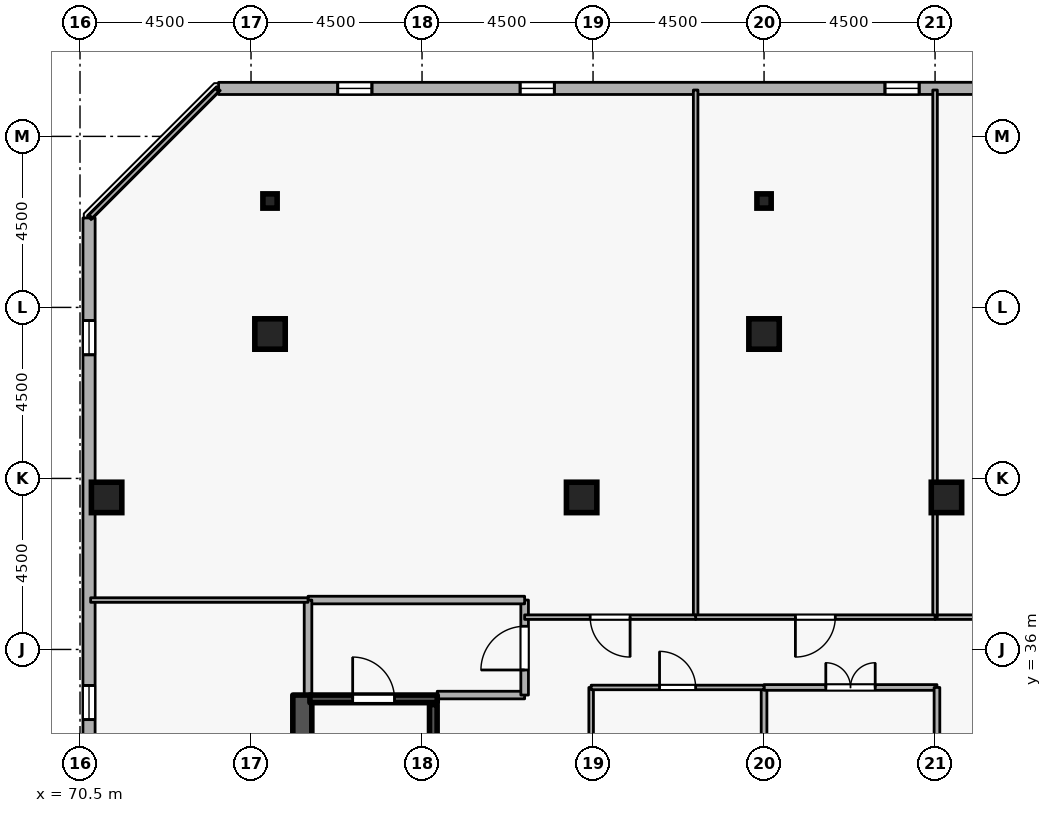
"""IFC4 building model, lengths in metres.
Left out: names, types, materials, properties, quantities, classifications, styles, units other than length and angle.
Written with IfcOpenShell. Run it as: python <this file> out.ifc"""

import sys

from ifc_helpers import new_model, si_unit, direction, frame, frame_2d, origin, origin_2d, place, context, subcontext, project, spatial, rectangle, i_section, extrude, element, fill, save


model = new_model("IFC4")
c1 = context("Model", 3, precision=1e-05, world=origin(), true_north=direction((0.0, 1.0)))
c2 = subcontext(c1, "Body", "Model", "MODEL_VIEW")
j1 = project(units=[si_unit("LENGTHUNIT", "METRE"), si_unit("PLANEANGLEUNIT", "RADIAN")], contexts=[c1])
p1 = place(None, origin())
s1 = spatial("IfcSite", under=j1, at=p1, CompositionType="ELEMENT")
p2 = place(p1, origin())
s2 = spatial("IfcBuilding", under=s1, at=p2, CompositionType="ELEMENT")
p3 = place(p2, frame((0.0, 0.0, 265.5)))
s3 = spatial("IfcBuildingStorey", under=s2, at=p3, CompositionType="ELEMENT", Elevation=265.5)
p4 = place(p3, frame((76.35, 19.2, 0.0), z_axis=(0.0, 0.0, 1.0), x_axis=(0.0, 1.0, 0.0)))
e1 = element("IfcWall", 1, at=p4, inside=s3, PredefinedType="SHEAR", context=c2, shape_type="SweptSolid", body=[
    extrude(rectangle(XDim=15.6, YDim=0.5, at=frame_2d((7.8, 0.0))), origin(), (0.0, 0.0, 1.0), 3.6),
])
for number, where, z_axis, x_axis in (
    (2, (88.5, 44.3, 0.0), (0.0, 0.0, 1.0), (1.0, 0.0, 0.0)),
    (3, (75.5, 44.3, 0.0), (0.0, 0.0, 1.0), (1.0, 0.0, 0.0)),
    (4, (71.2, 40.0, 0.0), (0.0, 0.0, 1.0), (1.0, 0.0, 0.0)),
    (5, (93.3, 40.0, 0.0), (0.0, 0.0, 1.0), (1.0, 0.0, 0.0)),
    (6, (83.7, 40.0, 0.0), (0.0, 0.0, 1.0), (1.0, 0.0, 0.0)),
):
    element("IfcColumn", number, at=place(p3, frame(where, z_axis=z_axis, x_axis=x_axis)), inside=s3, PredefinedType="COLUMN", context=c2, shape_type="SweptSolid", body=[
        extrude(rectangle(XDim=0.8, YDim=0.8, at=origin_2d()), origin(), (0.0, 0.0, 1.0), 3.6),
    ])
for number, where, z_axis, x_axis in (
    (7, (88.5, 47.8, 0.0), (0.0, 0.0, 1.0), (1.0, 0.0, 0.0)),
    (8, (75.5, 47.8, 0.0), (0.0, 0.0, 1.0), (1.0, 0.0, 0.0)),
):
    element("IfcColumn", number, at=place(p3, frame(where, z_axis=z_axis, x_axis=x_axis)), inside=s3, PredefinedType="COLUMN", context=c2, shape_type="SweptSolid", body=[
        extrude(i_section(OverallWidth=0.375, OverallDepth=0.375, WebThickness=0.017, FlangeThickness=0.027, FilletRadius=0.015, at=origin_2d()), origin(), (0.0, 0.0, 1.0), 3.6),
    ])
p5 = place(p3, frame((109.681, 50.765, 0.0), z_axis=(0.0, 0.0, 1.0), x_axis=(-0.999999997144, -7.5574884e-05, 0.0)))
e9 = element("IfcWall", 9, at=p5, inside=s3, PredefinedType="STANDARD", context=c2, shape_type="SweptSolid", body=[
    extrude(rectangle(XDim=35.535, YDim=0.32, at=frame_2d((17.768, 0.0))), origin(), (0.0, 0.0, 1.0), 2.7),
])
p6 = place(p5, frame((2.7, 0.0, 0.72)))
e10 = element("IfcOpeningElement", 10, at=p6, cuts=e9, PredefinedType="OPENING", context=c2, shape_type="SweptSolid", body=[
    extrude(rectangle(XDim=0.9, YDim=1.75, at=frame_2d((0.45, 0.875))), frame((0.0, 0.17, 0.0), z_axis=(0.0, -1.0, 0.0), x_axis=(1.0, 0.0, 0.0)), (0.0, 0.0, 1.0), 0.34),
])
p7 = place(p5, frame((7.5, 0.0, 0.72)))
e11 = element("IfcOpeningElement", 11, at=p7, cuts=e9, PredefinedType="OPENING", context=c2, shape_type="SweptSolid", body=[
    extrude(rectangle(XDim=0.9, YDim=1.75, at=frame_2d((0.45, 0.875))), frame((0.0, 0.17, 0.0), z_axis=(0.0, -1.0, 0.0), x_axis=(1.0, 0.0, 0.0)), (0.0, 0.0, 1.0), 0.34),
])
p8 = place(p5, frame((12.3, 0.0, 0.72)))
e12 = element("IfcOpeningElement", 12, at=p8, cuts=e9, PredefinedType="OPENING", context=c2, shape_type="SweptSolid", body=[
    extrude(rectangle(XDim=0.9, YDim=1.75, at=frame_2d((0.45, 0.875))), frame((0.0, 0.17, 0.0), z_axis=(0.0, -1.0, 0.0), x_axis=(1.0, 0.0, 0.0)), (0.0, 0.0, 1.0), 0.34),
])
p9 = place(p5, frame((17.1, 0.0, 0.72)))
e13 = element("IfcOpeningElement", 13, at=p9, cuts=e9, PredefinedType="OPENING", context=c2, shape_type="SweptSolid", body=[
    extrude(rectangle(XDim=0.9, YDim=1.75, at=frame_2d((0.45, 0.875))), frame((0.0, 0.17, 0.0), z_axis=(0.0, -1.0, 0.0), x_axis=(1.0, 0.0, 0.0)), (0.0, 0.0, 1.0), 0.34),
])
p10 = place(p5, frame((26.7, 0.0, 0.72)))
e14 = element("IfcOpeningElement", 14, at=p10, cuts=e9, PredefinedType="OPENING", context=c2, shape_type="SweptSolid", body=[
    extrude(rectangle(XDim=0.9, YDim=1.75, at=frame_2d((0.45, 0.875))), frame((0.0, 0.17, 0.0), z_axis=(0.0, -1.0, 0.0), x_axis=(1.0, 0.0, 0.0)), (0.0, 0.0, 1.0), 0.34),
])
p11 = place(p5, frame((31.5, 0.0, 0.72)))
e15 = element("IfcOpeningElement", 15, at=p11, cuts=e9, PredefinedType="OPENING", context=c2, shape_type="SweptSolid", body=[
    extrude(rectangle(XDim=0.9, YDim=1.75, at=frame_2d((0.45, 0.875))), frame((0.0, 0.17, 0.0), z_axis=(0.0, -1.0, 0.0), x_axis=(1.0, 0.0, 0.0)), (0.0, 0.0, 1.0), 0.34),
])
p12 = place(p3, frame((70.738, 47.354, 0.0), z_axis=(0.0, 0.0, 1.0), x_axis=(-7.5574884e-05, -0.999999997144, 0.0)))
e16 = element("IfcWall", 16, at=p12, inside=s3, PredefinedType="STANDARD", context=c2, shape_type="SweptSolid", body=[
    extrude(rectangle(XDim=35.535, YDim=0.32, at=frame_2d((17.768, 0.0))), origin(), (0.0, 0.0, 1.0), 2.7),
])
p13 = place(p12, frame((2.7, 0.0, 0.72)))
e17 = element("IfcOpeningElement", 17, at=p13, cuts=e16, PredefinedType="OPENING", context=c2, shape_type="SweptSolid", body=[
    extrude(rectangle(XDim=0.9, YDim=1.75, at=frame_2d((0.45, 0.875))), frame((0.0, 0.17, 0.0), z_axis=(0.0, -1.0, 0.0), x_axis=(1.0, 0.0, 0.0)), (0.0, 0.0, 1.0), 0.34),
])
p14 = place(p12, frame((12.3, 0.0, 0.72)))
e18 = element("IfcOpeningElement", 18, at=p14, cuts=e16, PredefinedType="OPENING", context=c2, shape_type="SweptSolid", body=[
    extrude(rectangle(XDim=0.9, YDim=1.75, at=frame_2d((0.45, 0.875))), frame((0.0, 0.17, 0.0), z_axis=(0.0, -1.0, 0.0), x_axis=(1.0, 0.0, 0.0)), (0.0, 0.0, 1.0), 0.34),
])
p15 = place(p12, frame((17.1, 0.0, 0.72)))
e19 = element("IfcOpeningElement", 19, at=p15, cuts=e16, PredefinedType="OPENING", context=c2, shape_type="SweptSolid", body=[
    extrude(rectangle(XDim=0.9, YDim=1.75, at=frame_2d((0.45, 0.875))), frame((0.0, 0.17, 0.0), z_axis=(0.0, -1.0, 0.0), x_axis=(1.0, 0.0, 0.0)), (0.0, 0.0, 1.0), 0.34),
])
p16 = place(p12, frame((21.9, 0.0, 0.72)))
e20 = element("IfcOpeningElement", 20, at=p16, cuts=e16, PredefinedType="OPENING", context=c2, shape_type="SweptSolid", body=[
    extrude(rectangle(XDim=0.9, YDim=1.75, at=frame_2d((0.45, 0.875))), frame((0.0, 0.17, 0.0), z_axis=(0.0, -1.0, 0.0), x_axis=(1.0, 0.0, 0.0)), (0.0, 0.0, 1.0), 0.34),
])
p17 = place(p12, frame((26.7, 0.0, 0.72)))
e21 = element("IfcOpeningElement", 21, at=p17, cuts=e16, PredefinedType="OPENING", context=c2, shape_type="SweptSolid", body=[
    extrude(rectangle(XDim=0.9, YDim=1.75, at=frame_2d((0.45, 0.875))), frame((0.0, 0.17, 0.0), z_axis=(0.0, -1.0, 0.0), x_axis=(1.0, 0.0, 0.0)), (0.0, 0.0, 1.0), 0.34),
])
p18 = place(p3, frame((76.55, 34.7, 0.0), z_axis=(0.0, 0.0, 1.0), x_axis=(1.0, 0.0, 0.0)))
e22 = element("IfcWall", 22, at=p18, inside=s3, PredefinedType="SHEAR", context=c2, shape_type="SweptSolid", body=[
    extrude(rectangle(XDim=3.35, YDim=0.2, at=frame_2d((1.675, 0.0))), origin(), (0.0, 0.0, 1.0), 3.6),
])
p19 = place(p18, frame((1.125, 0.0, 0.0)))
e23 = element("IfcOpeningElement", 23, at=p19, cuts=e22, PredefinedType="OPENING", context=c2, shape_type="SweptSolid", body=[
    extrude(rectangle(XDim=1.1, YDim=2.1, at=frame_2d((0.55, 1.05))), frame((0.0, 0.11, 0.0), z_axis=(0.0, -1.0, 0.0), x_axis=(1.0, 0.0, 0.0)), (0.0, 0.0, 1.0), 0.22),
])
p20 = place(p3, frame((79.797, 27.45, 0.0), z_axis=(0.0, 0.0, 1.0), x_axis=(0.0, 1.0, 0.0)))
e24 = element("IfcWall", 24, at=p20, inside=s3, PredefinedType="SHEAR", context=c2, shape_type="SweptSolid", body=[
    extrude(rectangle(XDim=7.1, YDim=0.2, at=frame_2d((3.55, 0.0))), origin(), (0.0, 0.0, 1.0), 3.6),
])
p21 = place(p3, frame((79.9, 34.8, 0.0), z_axis=(0.0, 0.0, 1.0), x_axis=(1.0, 0.0, 0.0)))
e25 = element("IfcWall", 25, at=p21, inside=s3, PredefinedType="STANDARD", context=c2, shape_type="SweptSolid", body=[
    extrude(rectangle(XDim=2.3, YDim=0.2, at=frame_2d((1.15, 0.0))), origin(), (0.0, 0.0, 1.0), 2.545),
])
p22 = place(p3, frame((82.2, 34.8, 0.0), z_axis=(0.0, 0.0, 1.0), x_axis=(0.0, 1.0, 0.0)))
e26 = element("IfcWall", 26, at=p22, inside=s3, PredefinedType="STANDARD", context=c2, shape_type="SweptSolid", body=[
    extrude(rectangle(XDim=2.5, YDim=0.2, at=frame_2d((1.25, 0.0))), origin(), (0.0, 0.0, 1.0), 3.34),
])
p23 = place(p22, frame((0.66, 0.0, 0.0)))
e27 = element("IfcOpeningElement", 27, at=p23, cuts=e26, PredefinedType="OPENING", context=c2, shape_type="SweptSolid", body=[
    extrude(rectangle(XDim=1.15, YDim=2.1, at=frame_2d((0.575, 1.05))), frame((0.0, 0.11, 0.0), z_axis=(0.0, -1.0, 0.0), x_axis=(1.0, 0.0, 0.0)), (0.0, 0.0, 1.0), 0.22),
])
p24 = place(p3, frame((82.2, 37.3, 0.0), z_axis=(0.0, 0.0, 1.0), x_axis=(-1.0, 0.0, 0.0)))
e28 = element("IfcWall", 28, at=p24, inside=s3, PredefinedType="STANDARD", context=c2, shape_type="SweptSolid", body=[
    extrude(rectangle(XDim=5.7, YDim=0.2, at=frame_2d((2.85, 0.0))), origin(), (0.0, 0.0, 1.0), 3.34),
])
p25 = place(p3, frame((76.5, 37.3, 0.0), z_axis=(0.0, 0.0, 1.0), x_axis=(0.0, -1.0, 0.0)))
e29 = element("IfcWall", 29, at=p25, inside=s3, PredefinedType="STANDARD", context=c2, shape_type="SweptSolid", body=[
    extrude(rectangle(XDim=2.5, YDim=0.2, at=frame_2d((1.25, 0.0))), origin(), (0.0, 0.0, 1.0), 3.34),
])
p26 = place(p3, frame((100.7, 36.85, 0.0), z_axis=(0.0, 0.0, 1.0), x_axis=(-1.0, 0.0, 0.0)))
e30 = element("IfcWall", 30, at=p26, inside=s3, PredefinedType="PARTITIONING", context=c2, shape_type="SweptSolid", body=[
    extrude(rectangle(XDim=7.7, YDim=0.12, at=frame_2d((3.85, 0.0))), origin(), (0.0, 0.0, 1.0), 3.34),
])
p27 = place(p26, frame((3.325, 0.0, 0.0)))
e31 = element("IfcOpeningElement", 31, at=p27, cuts=e30, PredefinedType="OPENING", context=c2, shape_type="SweptSolid", body=[
    extrude(rectangle(XDim=1.05, YDim=2.1, at=frame_2d((0.525, 1.05))), frame((0.0, 0.07, 0.0), z_axis=(0.0, -1.0, 0.0), x_axis=(1.0, 0.0, 0.0)), (0.0, 0.0, 1.0), 0.14),
])
for number, where, z_axis, x_axis in (
    (32, (93.0, 36.85, 0.0), (0.0, 0.0, 1.0), (0.0, 1.0, 0.0)),
    (33, (86.7, 36.85, 0.0), (0.0, 0.0, 1.0), (0.0, 1.0, 0.0)),
):
    element("IfcWall", number, at=place(p3, frame(where, z_axis=z_axis, x_axis=x_axis)), inside=s3, PredefinedType="PARTITIONING", context=c2, shape_type="SweptSolid", body=[
        extrude(rectangle(XDim=13.87, YDim=0.12, at=frame_2d((6.935, 0.0))), origin(), (0.0, 0.0, 1.0), 3.34),
    ])
p28 = place(p3, frame((93.0, 36.85, 0.0), z_axis=(0.0, 0.0, 1.0), x_axis=(-1.0, 0.0, 0.0)))
e34 = element("IfcWall", 34, at=p28, inside=s3, PredefinedType="PARTITIONING", context=c2, shape_type="SweptSolid", body=[
    extrude(rectangle(XDim=6.3, YDim=0.12, at=frame_2d((3.15, 0.0))), origin(), (0.0, 0.0, 1.0), 3.34),
])
p29 = place(p28, frame((2.625, 0.0, 0.0)))
e35 = element("IfcOpeningElement", 35, at=p29, cuts=e34, PredefinedType="OPENING", context=c2, shape_type="SweptSolid", body=[
    extrude(rectangle(XDim=1.05, YDim=2.1, at=frame_2d((0.525, 1.05))), frame((0.0, 0.07, 0.0), z_axis=(0.0, -1.0, 0.0), x_axis=(1.0, 0.0, 0.0)), (0.0, 0.0, 1.0), 0.14),
])
p30 = place(p3, frame((76.5, 37.3, 0.0), z_axis=(0.0, 0.0, 1.0), x_axis=(-1.0, 0.0, 0.0)))
e36 = element("IfcWall", 36, at=p30, inside=s3, PredefinedType="PARTITIONING", context=c2, shape_type="SweptSolid", body=[
    extrude(rectangle(XDim=5.72, YDim=0.12, at=frame_2d((2.86, 0.0))), origin(), (0.0, 0.0, 1.0), 3.34),
])
p31 = place(p3, frame((70.78, 47.394, 0.0), z_axis=(0.0, 0.0, 1.0), x_axis=(0.707106781187, 0.707106781187, 0.0)))
e37 = element("IfcWall", 37, at=p31, inside=s3, PredefinedType="PARTITIONING", context=c2, shape_type="SweptSolid", body=[
    extrude(rectangle(XDim=4.703, YDim=0.12, at=frame_2d((2.352, 0.0))), origin(), (0.0, 0.0, 1.0), 3.34),
])
p32 = place(p3, frame((86.7, 36.85, 0.0), z_axis=(0.0, 0.0, 1.0), x_axis=(-1.0, 0.0, 0.0)))
e38 = element("IfcWall", 38, at=p32, inside=s3, PredefinedType="PARTITIONING", context=c2, shape_type="SweptSolid", body=[
    extrude(rectangle(XDim=4.5, YDim=0.12, at=frame_2d((2.25, 0.0))), origin(), (0.0, 0.0, 1.0), 3.34),
])
p33 = place(p32, frame((1.725, 0.0, 0.0)))
e39 = element("IfcOpeningElement", 39, at=p33, cuts=e38, PredefinedType="OPENING", context=c2, shape_type="SweptSolid", body=[
    extrude(rectangle(XDim=1.05, YDim=2.1, at=frame_2d((0.525, 1.05))), frame((0.0, 0.07, 0.0), z_axis=(0.0, -1.0, 0.0), x_axis=(1.0, 0.0, 0.0)), (0.0, 0.0, 1.0), 0.14),
])
p34 = place(p3, frame((88.5, 32.2, 0.0), z_axis=(0.0, 0.0, 1.0), x_axis=(0.0, 1.0, 0.0)))
e40 = element("IfcWall", 40, at=p34, inside=s3, PredefinedType="PARTITIONING", context=c2, shape_type="SweptSolid", body=[
    extrude(rectangle(XDim=2.8, YDim=0.15, at=frame_2d((1.4, 0.0))), origin(), (0.0, 0.0, 1.0), 3.34),
])
p35 = place(p3, frame((88.5, 35.0, 0.0), z_axis=(0.0, 0.0, 1.0), x_axis=(1.0, 0.0, 0.0)))
e41 = element("IfcWall", 41, at=p35, inside=s3, PredefinedType="PARTITIONING", context=c2, shape_type="SweptSolid", body=[
    extrude(rectangle(XDim=4.55, YDim=0.15, at=frame_2d((2.275, 0.0))), origin(), (0.0, 0.0, 1.0), 3.34),
])
p36 = place(p35, frame((1.625, 0.0, 0.0)))
e42 = element("IfcOpeningElement", 42, at=p36, cuts=e41, PredefinedType="OPENING", context=c2, shape_type="SweptSolid", body=[
    extrude(rectangle(XDim=1.3, YDim=2.12, at=frame_2d((0.65, 1.06))), frame((0.0, 0.085, 0.0), z_axis=(0.0, -1.0, 0.0), x_axis=(1.0, 0.0, 0.0)), (0.0, 0.0, 1.0), 0.17),
])
p37 = place(p3, frame((93.05, 35.0, 0.0), z_axis=(0.0, 0.0, 1.0), x_axis=(0.0, -1.0, 0.0)))
e43 = element("IfcWall", 43, at=p37, inside=s3, PredefinedType="PARTITIONING", context=c2, shape_type="SweptSolid", body=[
    extrude(rectangle(XDim=2.8, YDim=0.15, at=frame_2d((1.4, 0.0))), origin(), (0.0, 0.0, 1.0), 3.34),
])
p38 = place(p3, frame((83.95, 32.2, 0.0), z_axis=(0.0, 0.0, 1.0), x_axis=(0.0, 1.0, 0.0)))
e44 = element("IfcWall", 44, at=p38, inside=s3, PredefinedType="PARTITIONING", context=c2, shape_type="SweptSolid", body=[
    extrude(rectangle(XDim=2.8, YDim=0.12, at=frame_2d((1.4, 0.0))), origin(), (0.0, 0.0, 1.0), 3.34),
])
p39 = place(p3, frame((83.95, 35.0, 0.0), z_axis=(0.0, 0.0, 1.0), x_axis=(1.0, 0.0, 0.0)))
e45 = element("IfcWall", 45, at=p39, inside=s3, PredefinedType="PARTITIONING", context=c2, shape_type="SweptSolid", body=[
    extrude(rectangle(XDim=4.55, YDim=0.12, at=frame_2d((2.275, 0.0))), origin(), (0.0, 0.0, 1.0), 3.34),
])
p40 = place(p39, frame((1.8, 0.0, 0.0)))
e46 = element("IfcOpeningElement", 46, at=p40, cuts=e45, PredefinedType="OPENING", context=c2, shape_type="SweptSolid", body=[
    extrude(rectangle(XDim=0.95, YDim=2.1, at=frame_2d((0.475, 1.05))), frame((0.0, 0.07, 0.0), z_axis=(0.0, -1.0, 0.0), x_axis=(1.0, 0.0, 0.0)), (0.0, 0.0, 1.0), 0.14),
])
p41 = place(p9, origin())
e47 = element("IfcWindow", 47, at=p41, inside=s3, PartitioningType="SINGLE_PANEL", PredefinedType="WINDOW", context=c2, shape_type="SweptSolid", body=[
    extrude(rectangle(XDim=0.9, YDim=1.75, at=frame_2d((0.45, 0.875))), frame((0.0, 0.03, 0.0), z_axis=(0.0, -1.0, 0.0), x_axis=(1.0, 0.0, 0.0)), (0.0, 0.0, 1.0), 0.06),
])
fill(e13, e47)
p42 = place(p10, origin())
e48 = element("IfcWindow", 48, at=p42, inside=s3, PartitioningType="SINGLE_PANEL", PredefinedType="WINDOW", context=c2, shape_type="SweptSolid", body=[
    extrude(rectangle(XDim=0.9, YDim=1.75, at=frame_2d((0.45, 0.875))), frame((0.0, 0.03, 0.0), z_axis=(0.0, -1.0, 0.0), x_axis=(1.0, 0.0, 0.0)), (0.0, 0.0, 1.0), 0.06),
])
fill(e14, e48)
p43 = place(p11, origin())
e49 = element("IfcWindow", 49, at=p43, inside=s3, PartitioningType="SINGLE_PANEL", PredefinedType="WINDOW", context=c2, shape_type="SweptSolid", body=[
    extrude(rectangle(XDim=0.9, YDim=1.75, at=frame_2d((0.45, 0.875))), frame((0.0, 0.03, 0.0), z_axis=(0.0, -1.0, 0.0), x_axis=(1.0, 0.0, 0.0)), (0.0, 0.0, 1.0), 0.06),
])
fill(e15, e49)
p44 = place(p13, origin())
e50 = element("IfcWindow", 50, at=p44, inside=s3, PartitioningType="SINGLE_PANEL", PredefinedType="WINDOW", context=c2, shape_type="SweptSolid", body=[
    extrude(rectangle(XDim=0.9, YDim=1.75, at=frame_2d((0.45, 0.875))), frame((0.0, 0.03, 0.0), z_axis=(0.0, -1.0, 0.0), x_axis=(1.0, 0.0, 0.0)), (0.0, 0.0, 1.0), 0.06),
])
fill(e17, e50)
p45 = place(p14, origin())
e51 = element("IfcWindow", 51, at=p45, inside=s3, PartitioningType="SINGLE_PANEL", PredefinedType="WINDOW", context=c2, shape_type="SweptSolid", body=[
    extrude(rectangle(XDim=0.9, YDim=1.75, at=frame_2d((0.45, 0.875))), frame((0.0, 0.03, 0.0), z_axis=(0.0, -1.0, 0.0), x_axis=(1.0, 0.0, 0.0)), (0.0, 0.0, 1.0), 0.06),
])
fill(e18, e51)
p46 = place(p19, origin())
e52 = element("IfcDoor", 52, at=p46, inside=s3, OperationType="SINGLE_SWING_LEFT", PredefinedType="DOOR", context=c2, shape_type="SweptSolid", body=[
    extrude(rectangle(XDim=1.1, YDim=2.1, at=frame_2d((0.55, 1.05))), frame((0.0, 0.025, 0.0), z_axis=(0.0, -1.0, 0.0), x_axis=(1.0, 0.0, 0.0)), (0.0, 0.0, 1.0), 0.05),
])
fill(e23, e52)
p47 = place(p23, origin())
e53 = element("IfcDoor", 53, at=p47, inside=s3, OperationType="SINGLE_SWING_LEFT", PredefinedType="DOOR", context=c2, shape_type="SweptSolid", body=[
    extrude(rectangle(XDim=1.15, YDim=2.1, at=frame_2d((0.575, 1.05))), frame((0.0, 0.025, 0.0), z_axis=(0.0, -1.0, 0.0), x_axis=(1.0, 0.0, 0.0)), (0.0, 0.0, 1.0), 0.05),
])
fill(e27, e53)
p48 = place(p29, origin())
e54 = element("IfcDoor", 54, at=p48, inside=s3, OperationType="SINGLE_SWING_RIGHT", PredefinedType="DOOR", context=c2, shape_type="SweptSolid", body=[
    extrude(rectangle(XDim=1.05, YDim=2.1, at=frame_2d((0.525, 1.05))), frame((0.0, 0.025, 0.0), z_axis=(0.0, -1.0, 0.0), x_axis=(1.0, 0.0, 0.0)), (0.0, 0.0, 1.0), 0.05),
])
fill(e35, e54)
p49 = place(p33, origin())
e55 = element("IfcDoor", 55, at=p49, inside=s3, OperationType="SINGLE_SWING_LEFT", PredefinedType="DOOR", context=c2, shape_type="SweptSolid", body=[
    extrude(rectangle(XDim=1.05, YDim=2.1, at=frame_2d((0.525, 1.05))), frame((0.0, 0.025, 0.0), z_axis=(0.0, -1.0, 0.0), x_axis=(1.0, 0.0, 0.0)), (0.0, 0.0, 1.0), 0.05),
])
fill(e39, e55)
p50 = place(p36, origin())
e56 = element("IfcDoor", 56, at=p50, inside=s3, OperationType="DOUBLE_DOOR_SINGLE_SWING", PredefinedType="DOOR", context=c2, shape_type="SweptSolid", body=[
    extrude(rectangle(XDim=1.3, YDim=2.12, at=frame_2d((0.65, 1.06))), frame((0.0, 0.025, 0.0), z_axis=(0.0, -1.0, 0.0), x_axis=(1.0, 0.0, 0.0)), (0.0, 0.0, 1.0), 0.05),
])
fill(e42, e56)
p51 = place(p40, origin())
e57 = element("IfcDoor", 57, at=p51, inside=s3, OperationType="SINGLE_SWING_LEFT", PredefinedType="DOOR", context=c2, shape_type="SweptSolid", body=[
    extrude(rectangle(XDim=0.95, YDim=2.1, at=frame_2d((0.475, 1.05))), frame((0.0, 0.025, 0.0), z_axis=(0.0, -1.0, 0.0), x_axis=(1.0, 0.0, 0.0)), (0.0, 0.0, 1.0), 0.05),
])
fill(e46, e57)
save(model, sys.argv[1])
